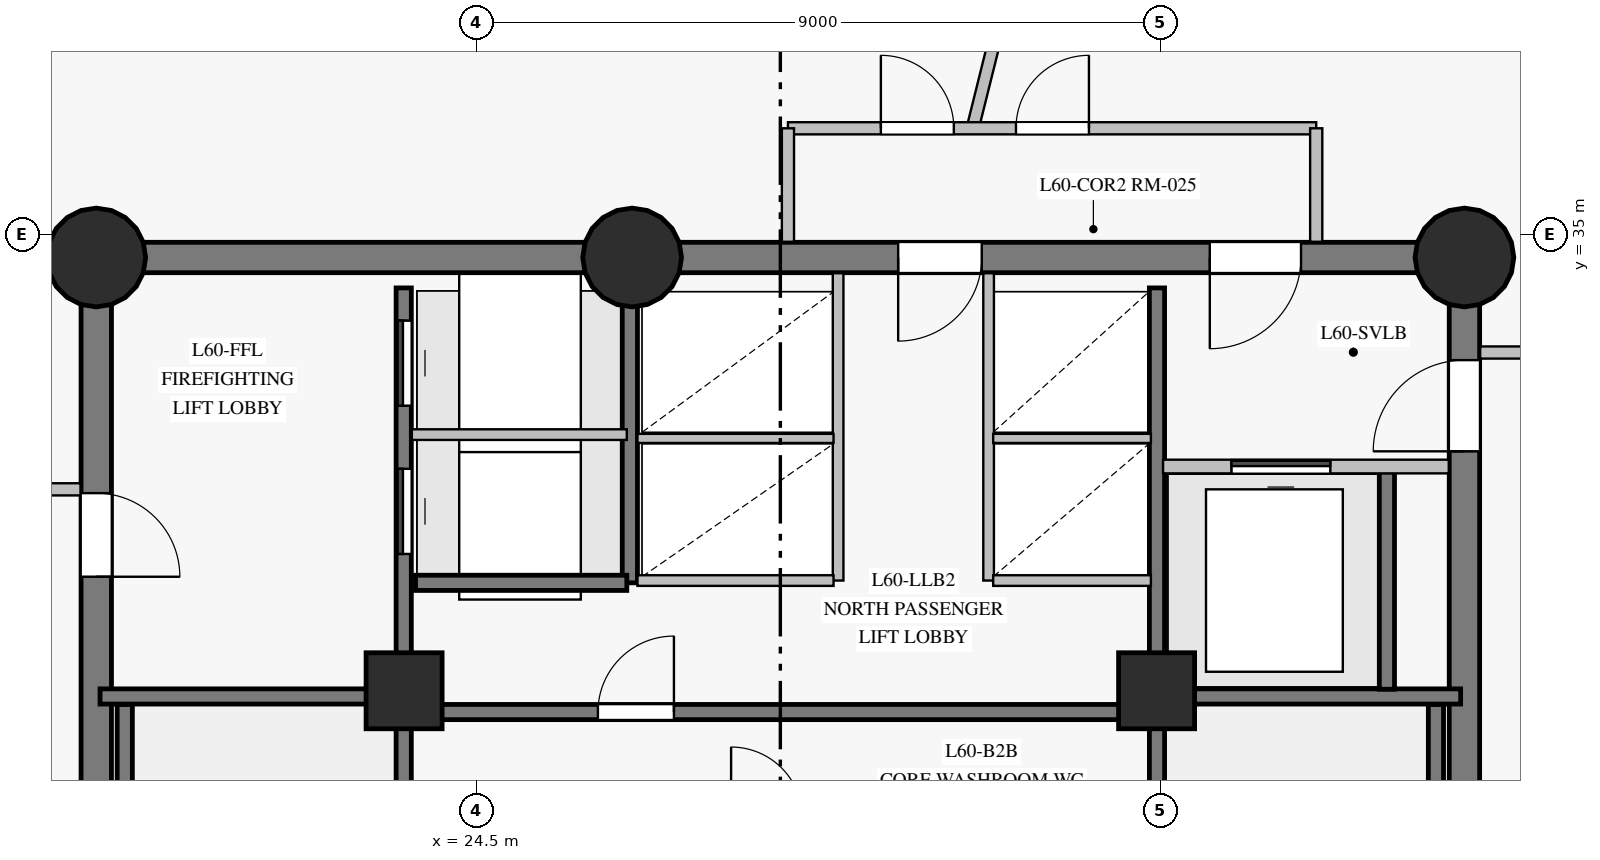
"""IFC4 building model, lengths in metres.
Left out: names, types, materials, properties, quantities, classifications, styles, units other than length and angle.
Written with IfcOpenShell. Run it as: python <this file> out.ifc"""

import sys

from ifc_helpers import new_model, si_unit, direction, frame, frame_2d, origin, origin_with_axes, origin_2d, place, context, subcontext, project, spatial, rectangle, circle, extrude, source, transform, mapped, element, fill, save


model = new_model("IFC4")
c1 = context("Model", 3, precision=1e-05, world=origin(), true_north=direction((0.0, 1.0)))
c2 = subcontext(c1, "Body", "Model", "MODEL_VIEW")
j1 = project(units=[si_unit("LENGTHUNIT", "METRE"), si_unit("PLANEANGLEUNIT", "RADIAN")], contexts=[c1])
p1 = place(None, origin())
s1 = spatial("IfcSite", under=j1, at=p1, CompositionType="ELEMENT")
p2 = place(p1, origin())
s2 = spatial("IfcBuilding", under=s1, at=p2, CompositionType="ELEMENT")
p3 = place(p2, frame((0.0, 0.0, 205.35)))
s3 = spatial("IfcBuildingStorey", under=s2, at=p3, CompositionType="ELEMENT", Elevation=205.35)
p4 = place(p3, frame((37.5, 18.3, 0.0), z_axis=(0.0, 0.0, 1.0), x_axis=(0.0, 1.0, 0.0)))
e1 = element("IfcWall", 1, at=p4, inside=s3, PredefinedType="SHEAR", context=c2, shape_type="SweptSolid", body=[
    extrude(rectangle(XDim=16.4, YDim=0.4, at=frame_2d((8.2, 0.0))), origin(), (0.0, 0.0, 1.0), 2.775),
])
p5 = place(p4, frame((13.85, 0.0, 0.0)))
e2 = element("IfcOpeningElement", 2, at=p5, cuts=e1, PredefinedType="OPENING", context=c2, shape_type="SweptSolid", body=[
    extrude(rectangle(XDim=1.2, YDim=2.15, at=frame_2d((0.6, 1.075))), frame((0.0, 0.21, 0.0), z_axis=(0.0, -1.0, 0.0), x_axis=(1.0, 0.0, 0.0)), (0.0, 0.0, 1.0), 0.42),
])
p6 = place(p3, frame((37.5, 34.7, 0.0), z_axis=(0.0, 0.0, 1.0), x_axis=(-1.0, 0.0, 0.0)))
e3 = element("IfcWall", 3, at=p6, inside=s3, PredefinedType="SHEAR", context=c2, shape_type="SweptSolid", body=[
    extrude(rectangle(XDim=10.95, YDim=0.4, at=frame_2d((5.475, 0.0))), origin(), (0.0, 0.0, 1.0), 2.775),
])
p7 = place(p6, frame((2.15, 0.0, 0.0)))
e4 = element("IfcOpeningElement", 4, at=p7, cuts=e3, PredefinedType="OPENING", context=c2, shape_type="SweptSolid", body=[
    extrude(rectangle(XDim=1.2, YDim=2.15, at=frame_2d((0.6, 1.075))), frame((0.0, 0.21, 0.0), z_axis=(0.0, -1.0, 0.0), x_axis=(1.0, 0.0, 0.0)), (0.0, 0.0, 1.0), 0.42),
])
p8 = place(p6, frame((6.35, 0.0, 0.0)))
e5 = element("IfcOpeningElement", 5, at=p8, cuts=e3, PredefinedType="OPENING", context=c2, shape_type="SweptSolid", body=[
    extrude(rectangle(XDim=1.1, YDim=2.15, at=frame_2d((0.55, 1.075))), frame((0.0, 0.21, 0.0), z_axis=(0.0, -1.0, 0.0), x_axis=(1.0, 0.0, 0.0)), (0.0, 0.0, 1.0), 0.42),
])
p9 = place(p3, frame((26.55, 34.7, 0.0), z_axis=(0.0, 0.0, 1.0), x_axis=(-1.0, 0.0, 0.0)))
e6 = element("IfcWall", 6, at=p9, inside=s3, PredefinedType="SHEAR", context=c2, shape_type="SweptSolid", body=[
    extrude(rectangle(XDim=7.05, YDim=0.4, at=frame_2d((3.525, 0.0))), origin(), (0.0, 0.0, 1.0), 2.775),
])
p10 = place(p3, frame((19.5, 34.7, 0.0), z_axis=(0.0, 0.0, 1.0), x_axis=(0.0, -1.0, 0.0)))
e7 = element("IfcWall", 7, at=p10, inside=s3, PredefinedType="SHEAR", context=c2, shape_type="SweptSolid", body=[
    extrude(rectangle(XDim=16.4, YDim=0.4, at=frame_2d((8.2, 0.0))), origin(), (0.0, 0.0, 1.0), 2.775),
])
p11 = place(p10, frame((3.1, 0.0, 0.0)))
e8 = element("IfcOpeningElement", 8, at=p11, cuts=e7, PredefinedType="OPENING", context=c2, shape_type="SweptSolid", body=[
    extrude(rectangle(XDim=1.1, YDim=2.15, at=frame_2d((0.55, 1.075))), frame((0.0, 0.21, 0.0), z_axis=(0.0, -1.0, 0.0), x_axis=(1.0, 0.0, 0.0)), (0.0, 0.0, 1.0), 0.42),
])
m1 = source(origin_with_axes(), c2, "Body", "SweptSolid", [
    extrude(circle(Radius=0.65, at=origin_2d()), origin(), (0.0, 0.0, 1.0), 3.05),
])
for number, where, z_axis, x_axis in (
    (9, (19.5, 34.7, 0.0), (0.0, 0.0, 1.0), (1.0, 0.0, 0.0)),
    (10, (26.55, 34.7, 0.0), (0.0, 0.0, 1.0), (1.0, 0.0, 0.0)),
    (11, (37.5, 34.7, 0.0), (0.0, 0.0, 1.0), (1.0, 0.0, 0.0)),
):
    element("IfcColumn", number, at=place(p3, frame(where, z_axis=z_axis, x_axis=x_axis)), inside=s3, PredefinedType="COLUMN", context=c2, shape_type="MappedRepresentation", body=[
        mapped(m1, transform((0.0, 0.0, 0.0), scale=1.0)),
    ])
m2 = source(origin_with_axes(), c2, "Body", "SweptSolid", [
    extrude(rectangle(XDim=1.0, YDim=1.0, at=origin_2d()), origin(), (0.0, 0.0, 1.0), 3.05),
])
for number, where, z_axis, x_axis in (
    (12, (23.55, 29.0, 0.0), (0.0, 0.0, 1.0), (1.0, 0.0, 0.0)),
    (13, (33.45, 29.0, 0.0), (0.0, 0.0, 1.0), (1.0, 0.0, 0.0)),
):
    element("IfcColumn", number, at=place(p3, frame(where, z_axis=z_axis, x_axis=x_axis)), inside=s3, PredefinedType="COLUMN", context=c2, shape_type="MappedRepresentation", body=[
        mapped(m2, transform((0.0, 0.0, 0.0), scale=1.0)),
    ])
p12 = place(p3, frame((23.545, 18.7, 0.0), z_axis=(0.0, 0.0, 1.0), x_axis=(0.0, 1.0, 0.0)))
e14 = element("IfcWall", 14, at=p12, inside=s3, PredefinedType="SHEAR", context=c2, shape_type="SweptSolid", body=[
    extrude(rectangle(XDim=15.6, YDim=0.2, at=frame_2d((7.8, 0.0))), origin(), (0.0, 0.0, 1.0), 2.775),
])
p13 = place(p12, frame((2.75, 0.0, 0.0)))
e15 = element("IfcOpeningElement", 15, at=p13, cuts=e14, PredefinedType="OPENING", context=c2, shape_type="SweptSolid", body=[
    extrude(rectangle(XDim=1.15, YDim=2.15, at=frame_2d((0.575, 1.075))), frame((0.0, 0.11, 0.0), z_axis=(0.0, -1.0, 0.0), x_axis=(1.0, 0.0, 0.0)), (0.0, 0.0, 1.0), 0.22),
])
p14 = place(p12, frame((0.14, 0.0, 0.0)))
e16 = element("IfcOpeningElement", 16, at=p14, cuts=e14, PredefinedType="OPENING", context=c2, shape_type="SweptSolid", body=[
    extrude(rectangle(XDim=0.88, YDim=2.1, at=frame_2d((0.44, 1.05))), frame((0.0, 0.11, 0.0), z_axis=(0.0, -1.0, 0.0), x_axis=(1.0, 0.0, 0.0)), (0.0, 0.0, 1.0), 0.22),
])
p15 = place(p12, frame((1.36, 0.0, 0.0)))
e17 = element("IfcOpeningElement", 17, at=p15, cuts=e14, PredefinedType="OPENING", context=c2, shape_type="SweptSolid", body=[
    extrude(rectangle(XDim=0.88, YDim=2.1, at=frame_2d((0.44, 1.05))), frame((0.0, 0.11, 0.0), z_axis=(0.0, -1.0, 0.0), x_axis=(1.0, 0.0, 0.0)), (0.0, 0.0, 1.0), 0.22),
])
p16 = place(p12, frame((12.1, 0.0, 0.0)))
e18 = element("IfcOpeningElement", 18, at=p16, cuts=e14, PredefinedType="OPENING", context=c2, shape_type="SweptSolid", body=[
    extrude(rectangle(XDim=1.12, YDim=2.15, at=frame_2d((0.56, 1.075))), frame((0.0, 0.11, 0.0), z_axis=(0.0, -1.0, 0.0), x_axis=(1.0, 0.0, 0.0)), (0.0, 0.0, 1.0), 0.22),
])
p17 = place(p12, frame((14.05, 0.0, 0.0)))
e19 = element("IfcOpeningElement", 19, at=p17, cuts=e14, PredefinedType="OPENING", context=c2, shape_type="SweptSolid", body=[
    extrude(rectangle(XDim=1.12, YDim=2.15, at=frame_2d((0.56, 1.075))), frame((0.0, 0.11, 0.0), z_axis=(0.0, -1.0, 0.0), x_axis=(1.0, 0.0, 0.0)), (0.0, 0.0, 1.0), 0.22),
])
p18 = place(p3, frame((33.455, 18.7, 0.0), z_axis=(0.0, 0.0, 1.0), x_axis=(0.0, 1.0, 0.0)))
e20 = element("IfcWall", 20, at=p18, inside=s3, PredefinedType="SHEAR", context=c2, shape_type="SweptSolid", body=[
    extrude(rectangle(XDim=15.6, YDim=0.2, at=frame_2d((7.8, 0.0))), origin(), (0.0, 0.0, 1.0), 2.775),
])
p19 = place(p18, frame((2.75, 0.0, 0.0)))
e21 = element("IfcOpeningElement", 21, at=p19, cuts=e20, PredefinedType="OPENING", context=c2, shape_type="SweptSolid", body=[
    extrude(rectangle(XDim=1.15, YDim=2.15, at=frame_2d((0.575, 1.075))), frame((0.0, 0.11, 0.0), z_axis=(0.0, -1.0, 0.0), x_axis=(1.0, 0.0, 0.0)), (0.0, 0.0, 1.0), 0.22),
])
p20 = place(p18, frame((0.55, 0.0, 0.0)))
e22 = element("IfcOpeningElement", 22, at=p20, cuts=e20, PredefinedType="OPENING", context=c2, shape_type="SweptSolid", body=[
    extrude(rectangle(XDim=0.94, YDim=2.1, at=frame_2d((0.47, 1.05))), frame((0.0, 0.11, 0.0), z_axis=(0.0, -1.0, 0.0), x_axis=(1.0, 0.0, 0.0)), (0.0, 0.0, 1.0), 0.22),
])
p21 = place(p3, frame((23.7, 28.72, 0.0), z_axis=(0.0, 0.0, 1.0), x_axis=(1.0, 0.0, 0.0)))
e23 = element("IfcWall", 23, at=p21, inside=s3, PredefinedType="SHEAR", context=c2, shape_type="SweptSolid", body=[
    extrude(rectangle(XDim=9.6, YDim=0.2, at=frame_2d((4.8, 0.0))), origin(), (0.0, 0.0, 1.0), 2.775),
])
p22 = place(p21, frame((2.4, 0.0, 0.0)))
e24 = element("IfcOpeningElement", 24, at=p22, cuts=e23, PredefinedType="OPENING", context=c2, shape_type="SweptSolid", body=[
    extrude(rectangle(XDim=1.0, YDim=2.15, at=frame_2d((0.5, 1.075))), frame((0.0, 0.11, 0.0), z_axis=(0.0, -1.0, 0.0), x_axis=(1.0, 0.0, 0.0)), (0.0, 0.0, 1.0), 0.22),
])
for number, where, z_axis, x_axis in (
    (25, (19.875, 21.32, 0.0), (0.0, 0.0, 1.0), (0.0, 1.0, 0.0)),
    (26, (37.125, 21.32, 0.0), (0.0, 0.0, 1.0), (0.0, 1.0, 0.0)),
):
    element("IfcWall", number, at=place(p3, frame(where, z_axis=z_axis, x_axis=x_axis)), inside=s3, PredefinedType="SHEAR", context=c2, shape_type="SweptSolid", body=[
        extrude(rectangle(XDim=7.5, YDim=0.2, at=frame_2d((3.75, 0.0))), origin(), (0.0, 0.0, 1.0), 2.775),
    ])
for number, where, z_axis, x_axis in (
    (27, (33.455, 28.925, 0.0), (0.0, 0.0, 1.0), (1.0, 0.0, 0.0)),
    (28, (19.55, 28.925, 0.0), (0.0, 0.0, 1.0), (1.0, 0.0, 0.0)),
):
    element("IfcWall", number, at=place(p3, frame(where, z_axis=z_axis, x_axis=x_axis)), inside=s3, PredefinedType="SHEAR", context=c2, shape_type="SweptSolid", body=[
        extrude(rectangle(XDim=3.995, YDim=0.2, at=frame_2d((1.998, 0.0))), origin(), (0.0, 0.0, 1.0), 2.775),
    ])
p23 = place(p3, frame((26.52, 30.42, 0.0), z_axis=(0.0, 0.0, 1.0), x_axis=(0.0, 1.0, 0.0)))
e29 = element("IfcWall", 29, at=p23, inside=s3, PredefinedType="SHEAR", context=c2, shape_type="SweptSolid", body=[
    extrude(rectangle(XDim=3.86, YDim=0.2, at=frame_2d((1.93, 0.0))), origin(), (0.0, 0.0, 1.0), 2.775),
])
p24 = place(p3, frame((36.48, 29.02, 0.0), z_axis=(0.0, 0.0, 1.0), x_axis=(0.0, 1.0, 0.0)))
e30 = element("IfcWall", 30, at=p24, inside=s3, PredefinedType="SHEAR", context=c2, shape_type="SweptSolid", body=[
    extrude(rectangle(XDim=2.86, YDim=0.2, at=frame_2d((1.43, 0.0))), origin(), (0.0, 0.0, 1.0), 2.775),
])
p25 = place(p3, frame((23.7, 30.42, 0.0), z_axis=(0.0, 0.0, 1.0), x_axis=(1.0, 0.0, 0.0)))
e31 = element("IfcWall", 31, at=p25, inside=s3, PredefinedType="SHEAR", context=c2, shape_type="SweptSolid", body=[
    extrude(rectangle(XDim=2.78, YDim=0.2, at=frame_2d((1.39, 0.0))), origin(), (0.0, 0.0, 1.0), 2.775),
])
p26 = place(p3, frame((31.023, 36.371, 0.0), z_axis=(0.0, 0.0, 1.0), x_axis=(0.241933352584, 0.970292869657, 0.0)))
e32 = element("IfcWall", 32, at=p26, inside=s3, PredefinedType="PARTITIONING", context=c2, shape_type="SweptSolid", body=[
    extrude(rectangle(XDim=13.259, YDim=0.16, at=frame_2d((6.629, 0.0))), origin(), (0.0, 0.0, 1.0), 2.775),
])
p27 = place(p3, frame((28.6, 36.4, 0.0), z_axis=(0.0, 0.0, 1.0), x_axis=(1.0, 0.0, 0.0)))
e33 = element("IfcWall", 33, at=p27, inside=s3, PredefinedType="PARTITIONING", context=c2, shape_type="SweptSolid", body=[
    extrude(rectangle(XDim=6.95, YDim=0.16, at=frame_2d((3.475, 0.0))), origin(), (0.0, 0.0, 1.0), 2.325),
])
p28 = place(p27, frame((3.0, 0.0, 0.0)))
e34 = element("IfcOpeningElement", 34, at=p28, cuts=e33, PredefinedType="OPENING", context=c2, shape_type="SweptSolid", body=[
    extrude(rectangle(XDim=0.96, YDim=2.15, at=frame_2d((0.48, 1.075))), frame((0.0, 0.09, 0.0), z_axis=(0.0, -1.0, 0.0), x_axis=(1.0, 0.0, 0.0)), (0.0, 0.0, 1.0), 0.18),
])
p29 = place(p27, frame((1.222, 0.0, 0.0)))
e35 = element("IfcOpeningElement", 35, at=p29, cuts=e33, PredefinedType="OPENING", context=c2, shape_type="SweptSolid", body=[
    extrude(rectangle(XDim=0.96, YDim=2.15, at=frame_2d((0.48, 1.075))), frame((0.0, 0.09, 0.0), z_axis=(0.0, -1.0, 0.0), x_axis=(1.0, 0.0, 0.0)), (0.0, 0.0, 1.0), 0.18),
])
p30 = place(p3, frame((37.707, 33.45, 0.0), z_axis=(0.0, 0.0, 1.0), x_axis=(1.0, 0.0, 0.0)))
e36 = element("IfcWall", 36, at=p30, inside=s3, PredefinedType="PARTITIONING", context=c2, shape_type="SweptSolid", body=[
    extrude(rectangle(XDim=4.093, YDim=0.16, at=frame_2d((2.046, 0.0))), origin(), (0.0, 0.0, 1.0), 2.775),
])
for number, where, z_axis, x_axis in (
    (37, (29.26, 30.45, 0.0), (0.0, 0.0, 1.0), (0.0, 1.0, 0.0)),
    (38, (31.24, 30.45, 0.0), (0.0, 0.0, 1.0), (0.0, 1.0, 0.0)),
):
    element("IfcWall", number, at=place(p3, frame(where, z_axis=z_axis, x_axis=x_axis)), inside=s3, PredefinedType="PARTITIONING", context=c2, shape_type="SweptSolid", body=[
        extrude(rectangle(XDim=4.043, YDim=0.14, at=frame_2d((2.021, 0.0))), origin(), (0.0, 0.0, 1.0), 2.775),
    ])
p31 = place(p3, frame((33.535, 31.95, 0.0), z_axis=(0.0, 0.0, 1.0), x_axis=(1.0, 0.0, 0.0)))
e39 = element("IfcWall", 39, at=p31, inside=s3, PredefinedType="PARTITIONING", context=c2, shape_type="SweptSolid", body=[
    extrude(rectangle(XDim=3.759, YDim=0.18, at=frame_2d((1.879, 0.0))), origin(), (0.0, 0.0, 1.0), 2.775),
])
p32 = place(p31, frame((0.9, 0.0, 0.0)))
e40 = element("IfcOpeningElement", 40, at=p32, cuts=e39, PredefinedType="OPENING", context=c2, shape_type="SweptSolid", body=[
    extrude(rectangle(XDim=1.3, YDim=2.2, at=frame_2d((0.65, 1.1))), frame((0.0, 0.1, 0.0), z_axis=(0.0, -1.0, 0.0), x_axis=(1.0, 0.0, 0.0)), (0.0, 0.0, 1.0), 0.2),
])
p33 = place(p3, frame((23.652, 32.37, 0.0), z_axis=(0.0, 0.0, 1.0), x_axis=(1.0, 0.0, 0.0)))
e41 = element("IfcWall", 41, at=p33, inside=s3, PredefinedType="PARTITIONING", context=c2, shape_type="SweptSolid", body=[
    extrude(rectangle(XDim=2.828, YDim=0.14, at=frame_2d((1.414, 0.0))), origin(), (0.0, 0.0, 1.0), 2.775),
])
p34 = place(p3, frame((26.62, 30.45, 0.0), z_axis=(0.0, 0.0, 1.0), x_axis=(1.0, 0.0, 0.0)))
e42 = element("IfcWall", 42, at=p34, inside=s3, PredefinedType="PARTITIONING", context=c2, shape_type="SweptSolid", body=[
    extrude(rectangle(XDim=2.58, YDim=0.14, at=frame_2d((1.29, 0.0))), origin(), (0.0, 0.0, 1.0), 2.775),
])
p35 = place(p3, frame((26.62, 32.32, 0.0), z_axis=(0.0, 0.0, 1.0), x_axis=(1.0, 0.0, 0.0)))
e43 = element("IfcWall", 43, at=p35, inside=s3, PredefinedType="PARTITIONING", context=c2, shape_type="SweptSolid", body=[
    extrude(rectangle(XDim=2.58, YDim=0.12, at=frame_2d((1.29, 0.0))), origin(), (0.0, 0.0, 1.0), 2.775),
])
p36 = place(p3, frame((16.75, 31.65, 0.0), z_axis=(0.0, 0.0, 1.0), x_axis=(1.0, 0.0, 0.0)))
e44 = element("IfcWall", 44, at=p36, inside=s3, PredefinedType="PARTITIONING", context=c2, shape_type="SweptSolid", body=[
    extrude(rectangle(XDim=2.543, YDim=0.16, at=frame_2d((1.271, 0.0))), origin(), (0.0, 0.0, 1.0), 2.775),
])
p37 = place(p3, frame((31.3, 30.45, 0.0), z_axis=(0.0, 0.0, 1.0), x_axis=(1.0, 0.0, 0.0)))
e45 = element("IfcWall", 45, at=p37, inside=s3, PredefinedType="PARTITIONING", context=c2, shape_type="SweptSolid", body=[
    extrude(rectangle(XDim=2.075, YDim=0.14, at=frame_2d((1.038, 0.0))), origin(), (0.0, 0.0, 1.0), 2.775),
])
p38 = place(p3, frame((31.3, 32.32, 0.0), z_axis=(0.0, 0.0, 1.0), x_axis=(1.0, 0.0, 0.0)))
e46 = element("IfcWall", 46, at=p38, inside=s3, PredefinedType="PARTITIONING", context=c2, shape_type="SweptSolid", body=[
    extrude(rectangle(XDim=2.075, YDim=0.12, at=frame_2d((1.038, 0.0))), origin(), (0.0, 0.0, 1.0), 2.775),
])
for number, where, z_axis, x_axis in (
    (47, (28.6, 34.907, 0.0), (0.0, 0.0, 1.0), (0.0, 1.0, 0.0)),
    (48, (35.55, 36.4, 0.0), (0.0, 0.0, 1.0), (0.0, -1.0, 0.0)),
):
    element("IfcWall", number, at=place(p3, frame(where, z_axis=z_axis, x_axis=x_axis)), inside=s3, PredefinedType="PARTITIONING", context=c2, shape_type="SweptSolid", body=[
        extrude(rectangle(XDim=1.493, YDim=0.16, at=frame_2d((0.747, 0.0))), origin(), (0.0, 0.0, 1.0), 2.775),
    ])
m3 = source(origin_with_axes(), c2, "Body", "SweptSolid", [
    extrude(rectangle(XDim=1.1, YDim=2.15, at=frame_2d((0.55, 1.075))), frame((0.0, 0.025, 0.0), z_axis=(0.0, -1.0, 0.0), x_axis=(1.0, 0.0, 0.0)), (0.0, 0.0, 1.0), 0.05),
])
p39 = place(p11, origin())
e49 = element("IfcDoor", 49, at=p39, inside=s3, OperationType="SINGLE_SWING_RIGHT", PredefinedType="DOOR", context=c2, shape_type="MappedRepresentation", body=[
    mapped(m3, transform((0.0, 0.0, 0.0), scale=1.0)),
])
fill(e8, e49)
m4 = source(origin_with_axes(), c2, "Body", "SweptSolid", [
    extrude(rectangle(XDim=1.2, YDim=2.15, at=frame_2d((0.6, 1.075))), frame((0.0, 0.025, 0.0), z_axis=(0.0, -1.0, 0.0), x_axis=(1.0, 0.0, 0.0)), (0.0, 0.0, 1.0), 0.05),
])
p40 = place(p5, origin())
e50 = element("IfcDoor", 50, at=p40, inside=s3, OperationType="SINGLE_SWING_LEFT", PredefinedType="DOOR", context=c2, shape_type="MappedRepresentation", body=[
    mapped(m4, transform((0.0, 0.0, 0.0), scale=1.0)),
])
fill(e2, e50)
p41 = place(p7, origin())
e51 = element("IfcDoor", 51, at=p41, inside=s3, OperationType="SINGLE_SWING_RIGHT", PredefinedType="DOOR", context=c2, shape_type="MappedRepresentation", body=[
    mapped(m4, transform((0.0, 0.0, 0.0), scale=1.0)),
])
fill(e4, e51)
m5 = source(origin_with_axes(), c2, "Body", "SweptSolid", [
    extrude(rectangle(XDim=1.3, YDim=2.2, at=frame_2d((0.65, 1.1))), frame((0.0, 0.025, 0.0), z_axis=(0.0, -1.0, 0.0), x_axis=(1.0, 0.0, 0.0)), (0.0, 0.0, 1.0), 0.05),
])
p42 = place(p32, origin())
e52 = element("IfcDoor", 52, at=p42, inside=s3, OperationType="SLIDING_TO_LEFT", PredefinedType="DOOR", context=c2, shape_type="MappedRepresentation", body=[
    mapped(m5, transform((0.0, 0.0, 0.0), scale=1.0)),
])
fill(e40, e52)
m6 = source(origin_with_axes(), c2, "Body", "SweptSolid", [
    extrude(rectangle(XDim=1.0, YDim=2.15, at=frame_2d((0.5, 1.075))), frame((0.0, 0.025, 0.0), z_axis=(0.0, -1.0, 0.0), x_axis=(1.0, 0.0, 0.0)), (0.0, 0.0, 1.0), 0.05),
])
p43 = place(p22, origin())
e53 = element("IfcDoor", 53, at=p43, inside=s3, OperationType="SINGLE_SWING_RIGHT", PredefinedType="DOOR", context=c2, shape_type="MappedRepresentation", body=[
    mapped(m6, transform((0.0, 0.0, 0.0), scale=1.0)),
])
fill(e24, e53)
p44 = place(p8, origin())
e54 = element("IfcDoor", 54, at=p44, inside=s3, OperationType="SINGLE_SWING_RIGHT", PredefinedType="DOOR", context=c2, shape_type="MappedRepresentation", body=[
    mapped(m3, transform((0.0, 0.0, 0.0), scale=1.0)),
])
fill(e5, e54)
m7 = source(origin_with_axes(), c2, "Body", "SweptSolid", [
    extrude(rectangle(XDim=1.12, YDim=2.15, at=frame_2d((0.56, 1.075))), frame((0.0, 0.025, 0.0), z_axis=(0.0, -1.0, 0.0), x_axis=(1.0, 0.0, 0.0)), (0.0, 0.0, 1.0), 0.05),
])
p45 = place(p16, origin())
e55 = element("IfcDoor", 55, at=p45, inside=s3, OperationType="SLIDING_TO_LEFT", PredefinedType="DOOR", context=c2, shape_type="MappedRepresentation", body=[
    mapped(m7, transform((0.0, 0.0, 0.0), scale=1.0)),
])
fill(e18, e55)
p46 = place(p17, origin())
e56 = element("IfcDoor", 56, at=p46, inside=s3, OperationType="SLIDING_TO_RIGHT", PredefinedType="DOOR", context=c2, shape_type="MappedRepresentation", body=[
    mapped(m7, transform((0.0, 0.0, 0.0), scale=1.0)),
])
fill(e19, e56)
m8 = source(origin_with_axes(), c2, "Body", "SweptSolid", [
    extrude(rectangle(XDim=0.96, YDim=2.15, at=frame_2d((0.48, 1.075))), frame((0.0, 0.025, 0.0), z_axis=(0.0, -1.0, 0.0), x_axis=(1.0, 0.0, 0.0)), (0.0, 0.0, 1.0), 0.05),
])
p47 = place(p28, origin())
e57 = element("IfcDoor", 57, at=p47, inside=s3, OperationType="SINGLE_SWING_RIGHT", PredefinedType="DOOR", context=c2, shape_type="MappedRepresentation", body=[
    mapped(m8, transform((0.0, 0.0, 0.0), scale=1.0)),
])
fill(e34, e57)
p48 = place(p29, origin())
e58 = element("IfcDoor", 58, at=p48, inside=s3, OperationType="SINGLE_SWING_LEFT", PredefinedType="DOOR", context=c2, shape_type="MappedRepresentation", body=[
    mapped(m8, transform((0.0, 0.0, 0.0), scale=1.0)),
])
fill(e35, e58)
save(model, sys.argv[1])
